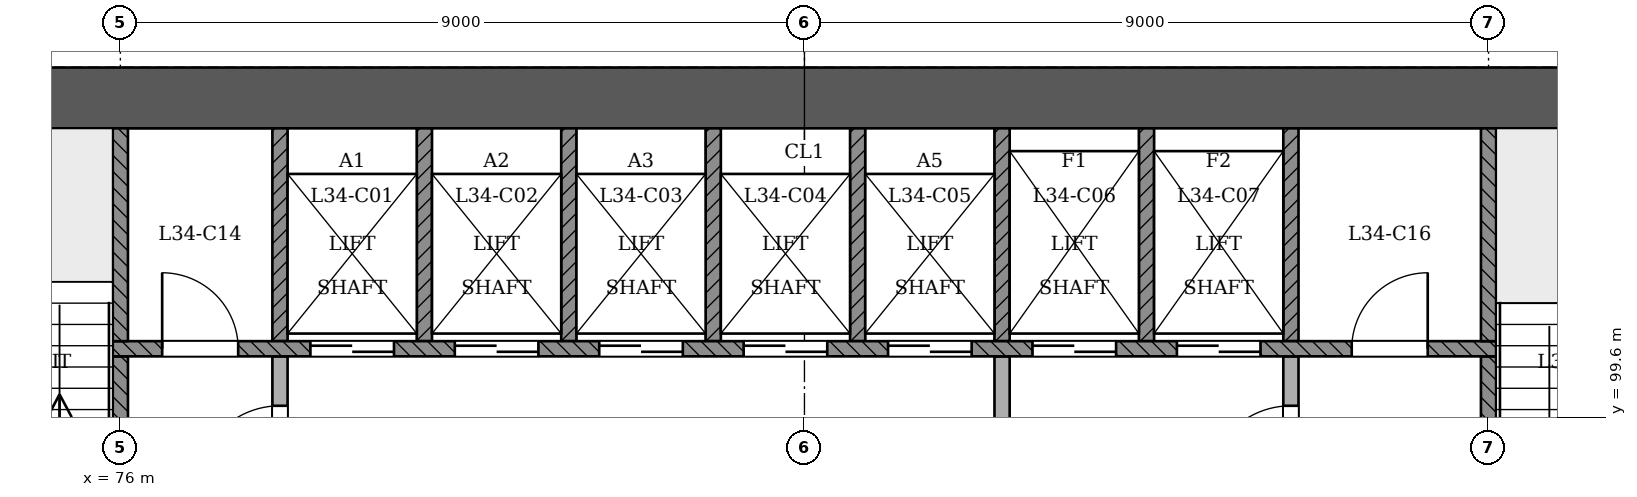
"""IFC4 building model, lengths in metres.
Left out: names, types, materials, properties, quantities, classifications, styles, units other than length and angle.
Written with IfcOpenShell. Run it as: python <this file> out.ifc"""

import sys

from ifc_helpers import new_model, si_unit, direction, frame, frame_2d, origin, place, context, subcontext, project, spatial, rectangle, extrude, element, fill, save


model = new_model("IFC4")
c1 = context("Model", 3, precision=1e-05, world=origin(), true_north=direction((0.0, 1.0)))
c2 = subcontext(c1, "Body", "Model", "MODEL_VIEW")
j1 = project(units=[si_unit("LENGTHUNIT", "METRE"), si_unit("PLANEANGLEUNIT", "RADIAN")], contexts=[c1])
p1 = place(None, origin())
s1 = spatial("IfcSite", under=j1, at=p1, CompositionType="ELEMENT")
p2 = place(p1, origin())
s2 = spatial("IfcBuilding", under=s1, at=p2, CompositionType="ELEMENT")
p3 = place(p2, frame((0.0, 0.0, 135.0)))
s3 = spatial("IfcBuildingStorey", under=s2, at=p3, CompositionType="ELEMENT", Elevation=135.0)
p4 = place(p3, frame((97.4, 103.8, 0.0), z_axis=(0.0, 0.0, 1.0), x_axis=(-1.0, 0.0, 0.0)))
e1 = element("IfcWall", 1, at=p4, inside=s3, PredefinedType="SHEAR", context=c2, shape_type="SweptSolid", body=[
    extrude(rectangle(XDim=25.2, YDim=0.8, at=frame_2d((12.6, 0.0))), origin(), (0.0, 0.0, 1.0), 3.6),
])
p5 = place(p3, frame((87.6, 93.4, 0.0), z_axis=(0.0, 0.0, 1.0), x_axis=(0.0, 1.0, 0.0)))
e2 = element("IfcWall", 2, at=p5, inside=s3, PredefinedType="PARTITIONING", context=c2, shape_type="SweptSolid", body=[
    extrude(rectangle(XDim=7.0, YDim=0.2, at=frame_2d((3.5, 0.0))), origin(), (0.0, 0.0, 1.0), 3.15),
])
p6 = place(p5, frame((4.45, 0.0, 0.0)))
e3 = element("IfcOpeningElement", 3, at=p6, cuts=e2, PredefinedType="OPENING", context=c2, shape_type="SweptSolid", body=[
    extrude(rectangle(XDim=1.1, YDim=2.1, at=frame_2d((0.55, 1.05))), frame((0.0, 0.11, 0.0), z_axis=(0.0, -1.0, 0.0), x_axis=(1.0, 0.0, 0.0)), (0.0, 0.0, 1.0), 0.221),
])
p7 = place(p3, frame((91.4, 96.2, 0.0), z_axis=(0.0, 0.0, 1.0), x_axis=(0.0, 1.0, 0.0)))
e4 = element("IfcWall", 4, at=p7, inside=s3, PredefinedType="PARTITIONING", context=c2, shape_type="SweptSolid", body=[
    extrude(rectangle(XDim=4.2, YDim=0.2, at=frame_2d((2.1, 0.0))), origin(), (0.0, 0.0, 1.0), 3.15),
])
p8 = place(p7, frame((2.45, 0.0, 0.0)))
e5 = element("IfcOpeningElement", 5, at=p8, cuts=e4, PredefinedType="OPENING", context=c2, shape_type="SweptSolid", body=[
    extrude(rectangle(XDim=1.1, YDim=2.1, at=frame_2d((0.55, 1.05))), frame((0.0, 0.11, 0.0), z_axis=(0.0, -1.0, 0.0), x_axis=(1.0, 0.0, 0.0)), (0.0, 0.0, 1.0), 0.221),
])
p9 = place(p3, frame((76.0, 96.7, 0.0), z_axis=(0.0, 0.0, 1.0), x_axis=(0.0, 1.0, 0.0)))
e6 = element("IfcWall", 6, at=p9, inside=s3, PredefinedType="SOLIDWALL", context=c2, shape_type="SweptSolid", body=[
    extrude(rectangle(XDim=3.7, YDim=0.2, at=frame_2d((1.85, 0.0))), origin(), (0.0, 0.0, 1.0), 3.15),
])
p10 = place(p9, frame((0.35, 0.0, 0.0)))
e7 = element("IfcOpeningElement", 7, at=p10, cuts=e6, PredefinedType="OPENING", context=c2, shape_type="SweptSolid", body=[
    extrude(rectangle(XDim=1.1, YDim=2.1, at=frame_2d((0.55, 1.05))), frame((0.0, 0.11, 0.0), z_axis=(0.0, -1.0, 0.0), x_axis=(1.0, 0.0, 0.0)), (0.0, 0.0, 1.0), 0.221),
])
p11 = place(p3, frame((78.1, 96.7, 0.0), z_axis=(0.0, 0.0, 1.0), x_axis=(0.0, 1.0, 0.0)))
e8 = element("IfcWall", 8, at=p11, inside=s3, PredefinedType="PARTITIONING", context=c2, shape_type="SweptSolid", body=[
    extrude(rectangle(XDim=3.7, YDim=0.2, at=frame_2d((1.85, 0.0))), origin(), (0.0, 0.0, 1.0), 3.15),
])
p12 = place(p11, frame((1.95, 0.0, 0.0)))
e9 = element("IfcOpeningElement", 9, at=p12, cuts=e8, PredefinedType="OPENING", context=c2, shape_type="SweptSolid", body=[
    extrude(rectangle(XDim=1.1, YDim=2.1, at=frame_2d((0.55, 1.05))), frame((0.0, 0.11, 0.0), z_axis=(0.0, -1.0, 0.0), x_axis=(1.0, 0.0, 0.0)), (0.0, 0.0, 1.0), 0.221),
])
p13 = place(p3, frame((94.0, 96.7, 0.0), z_axis=(0.0, 0.0, 1.0), x_axis=(0.0, 1.0, 0.0)))
e10 = element("IfcWall", 10, at=p13, inside=s3, PredefinedType="SOLIDWALL", context=c2, shape_type="SweptSolid", body=[
    extrude(rectangle(XDim=3.7, YDim=0.2, at=frame_2d((1.85, 0.0))), origin(), (0.0, 0.0, 1.0), 3.15),
])
p14 = place(p13, frame((0.35, 0.0, 0.0)))
e11 = element("IfcOpeningElement", 11, at=p14, cuts=e10, PredefinedType="OPENING", context=c2, shape_type="SweptSolid", body=[
    extrude(rectangle(XDim=1.1, YDim=2.1, at=frame_2d((0.55, 1.05))), frame((0.0, 0.11, 0.0), z_axis=(0.0, -1.0, 0.0), x_axis=(1.0, 0.0, 0.0)), (0.0, 0.0, 1.0), 0.221),
])
p15 = place(p3, frame((75.9, 100.5, 0.0), z_axis=(0.0, 0.0, 1.0), x_axis=(1.0, 0.0, 0.0)))
e12 = element("IfcWall", 12, at=p15, inside=s3, PredefinedType="SOLIDWALL", context=c2, shape_type="SweptSolid", body=[
    extrude(rectangle(XDim=18.2, YDim=0.2, at=frame_2d((9.1, 0.0))), origin(), (0.0, 0.0, 1.0), 3.15),
])
p16 = place(p15, frame((2.6, 0.0, 0.0)))
e13 = element("IfcOpeningElement", 13, at=p16, cuts=e12, PredefinedType="OPENING", context=c2, shape_type="SweptSolid", body=[
    extrude(rectangle(XDim=1.1, YDim=2.1, at=frame_2d((0.55, 1.05))), frame((0.0, 0.11, 0.0), z_axis=(0.0, -1.0, 0.0), x_axis=(1.0, 0.0, 0.0)), (0.0, 0.0, 1.0), 0.221),
])
p17 = place(p15, frame((4.5, 0.0, 0.0)))
e14 = element("IfcOpeningElement", 14, at=p17, cuts=e12, PredefinedType="OPENING", context=c2, shape_type="SweptSolid", body=[
    extrude(rectangle(XDim=1.1, YDim=2.1, at=frame_2d((0.55, 1.05))), frame((0.0, 0.11, 0.0), z_axis=(0.0, -1.0, 0.0), x_axis=(1.0, 0.0, 0.0)), (0.0, 0.0, 1.0), 0.221),
])
p18 = place(p15, frame((6.4, 0.0, 0.0)))
e15 = element("IfcOpeningElement", 15, at=p18, cuts=e12, PredefinedType="OPENING", context=c2, shape_type="SweptSolid", body=[
    extrude(rectangle(XDim=1.1, YDim=2.1, at=frame_2d((0.55, 1.05))), frame((0.0, 0.11, 0.0), z_axis=(0.0, -1.0, 0.0), x_axis=(1.0, 0.0, 0.0)), (0.0, 0.0, 1.0), 0.221),
])
p19 = place(p15, frame((8.3, 0.0, 0.0)))
e16 = element("IfcOpeningElement", 16, at=p19, cuts=e12, PredefinedType="OPENING", context=c2, shape_type="SweptSolid", body=[
    extrude(rectangle(XDim=1.1, YDim=2.1, at=frame_2d((0.55, 1.05))), frame((0.0, 0.11, 0.0), z_axis=(0.0, -1.0, 0.0), x_axis=(1.0, 0.0, 0.0)), (0.0, 0.0, 1.0), 0.221),
])
p20 = place(p15, frame((10.2, 0.0, 0.0)))
e17 = element("IfcOpeningElement", 17, at=p20, cuts=e12, PredefinedType="OPENING", context=c2, shape_type="SweptSolid", body=[
    extrude(rectangle(XDim=1.1, YDim=2.1, at=frame_2d((0.55, 1.05))), frame((0.0, 0.11, 0.0), z_axis=(0.0, -1.0, 0.0), x_axis=(1.0, 0.0, 0.0)), (0.0, 0.0, 1.0), 0.221),
])
p21 = place(p15, frame((12.1, 0.0, 0.0)))
e18 = element("IfcOpeningElement", 18, at=p21, cuts=e12, PredefinedType="OPENING", context=c2, shape_type="SweptSolid", body=[
    extrude(rectangle(XDim=1.1, YDim=2.1, at=frame_2d((0.55, 1.05))), frame((0.0, 0.11, 0.0), z_axis=(0.0, -1.0, 0.0), x_axis=(1.0, 0.0, 0.0)), (0.0, 0.0, 1.0), 0.221),
])
p22 = place(p15, frame((14.0, 0.0, 0.0)))
e19 = element("IfcOpeningElement", 19, at=p22, cuts=e12, PredefinedType="OPENING", context=c2, shape_type="SweptSolid", body=[
    extrude(rectangle(XDim=1.1, YDim=2.1, at=frame_2d((0.55, 1.05))), frame((0.0, 0.11, 0.0), z_axis=(0.0, -1.0, 0.0), x_axis=(1.0, 0.0, 0.0)), (0.0, 0.0, 1.0), 0.221),
])
p23 = place(p15, frame((0.65, 0.0, 0.0)))
e20 = element("IfcOpeningElement", 20, at=p23, cuts=e12, PredefinedType="OPENING", context=c2, shape_type="SweptSolid", body=[
    extrude(rectangle(XDim=1.0, YDim=2.1, at=frame_2d((0.5, 1.05))), frame((0.0, 0.11, 0.0), z_axis=(0.0, -1.0, 0.0), x_axis=(1.0, 0.0, 0.0)), (0.0, 0.0, 1.0), 0.221),
])
p24 = place(p15, frame((16.3, 0.0, 0.0)))
e21 = element("IfcOpeningElement", 21, at=p24, cuts=e12, PredefinedType="OPENING", context=c2, shape_type="SweptSolid", body=[
    extrude(rectangle(XDim=1.0, YDim=2.1, at=frame_2d((0.5, 1.05))), frame((0.0, 0.11, 0.0), z_axis=(0.0, -1.0, 0.0), x_axis=(1.0, 0.0, 0.0)), (0.0, 0.0, 1.0), 0.221),
])
for number, where, z_axis, x_axis in (
    (22, (76.0, 100.6, 0.0), (0.0, 0.0, 1.0), (0.0, 1.0, 0.0)),
    (23, (78.1, 100.6, 0.0), (0.0, 0.0, 1.0), (0.0, 1.0, 0.0)),
    (24, (80.0, 100.6, 0.0), (0.0, 0.0, 1.0), (0.0, 1.0, 0.0)),
    (25, (81.9, 100.6, 0.0), (0.0, 0.0, 1.0), (0.0, 1.0, 0.0)),
    (26, (83.8, 100.6, 0.0), (0.0, 0.0, 1.0), (0.0, 1.0, 0.0)),
    (27, (85.7, 100.6, 0.0), (0.0, 0.0, 1.0), (0.0, 1.0, 0.0)),
    (28, (87.6, 100.6, 0.0), (0.0, 0.0, 1.0), (0.0, 1.0, 0.0)),
    (29, (89.5, 100.6, 0.0), (0.0, 0.0, 1.0), (0.0, 1.0, 0.0)),
    (30, (91.4, 100.6, 0.0), (0.0, 0.0, 1.0), (0.0, 1.0, 0.0)),
    (31, (94.0, 100.6, 0.0), (0.0, 0.0, 1.0), (0.0, 1.0, 0.0)),
):
    element("IfcWall", number, at=place(p3, frame(where, z_axis=z_axis, x_axis=x_axis)), inside=s3, PredefinedType="SOLIDWALL", context=c2, shape_type="SweptSolid", body=[
        extrude(rectangle(XDim=2.8, YDim=0.2, at=frame_2d((1.4, 0.0))), origin(), (0.0, 0.0, 1.0), 3.15),
    ])
p25 = place(p16, origin())
e32 = element("IfcDoor", 32, at=p25, inside=s3, OperationType="SLIDING_TO_RIGHT", PredefinedType="NOTDEFINED", context=c2, shape_type="SweptSolid", body=[
    extrude(rectangle(XDim=1.1, YDim=2.1, at=frame_2d((0.55, 1.05))), frame((0.0, 0.025, 0.0), z_axis=(0.0, -1.0, 0.0), x_axis=(1.0, 0.0, 0.0)), (0.0, 0.0, 1.0), 0.05),
])
fill(e13, e32)
p26 = place(p17, origin())
e33 = element("IfcDoor", 33, at=p26, inside=s3, OperationType="SLIDING_TO_LEFT", PredefinedType="NOTDEFINED", context=c2, shape_type="SweptSolid", body=[
    extrude(rectangle(XDim=1.1, YDim=2.1, at=frame_2d((0.55, 1.05))), frame((0.0, 0.025, 0.0), z_axis=(0.0, -1.0, 0.0), x_axis=(1.0, 0.0, 0.0)), (0.0, 0.0, 1.0), 0.05),
])
fill(e14, e33)
p27 = place(p18, origin())
e34 = element("IfcDoor", 34, at=p27, inside=s3, OperationType="SLIDING_TO_RIGHT", PredefinedType="NOTDEFINED", context=c2, shape_type="SweptSolid", body=[
    extrude(rectangle(XDim=1.1, YDim=2.1, at=frame_2d((0.55, 1.05))), frame((0.0, 0.025, 0.0), z_axis=(0.0, -1.0, 0.0), x_axis=(1.0, 0.0, 0.0)), (0.0, 0.0, 1.0), 0.05),
])
fill(e15, e34)
p28 = place(p19, origin())
e35 = element("IfcDoor", 35, at=p28, inside=s3, OperationType="SLIDING_TO_LEFT", PredefinedType="NOTDEFINED", context=c2, shape_type="SweptSolid", body=[
    extrude(rectangle(XDim=1.1, YDim=2.1, at=frame_2d((0.55, 1.05))), frame((0.0, 0.025, 0.0), z_axis=(0.0, -1.0, 0.0), x_axis=(1.0, 0.0, 0.0)), (0.0, 0.0, 1.0), 0.05),
])
fill(e16, e35)
p29 = place(p20, origin())
e36 = element("IfcDoor", 36, at=p29, inside=s3, OperationType="SLIDING_TO_RIGHT", PredefinedType="NOTDEFINED", context=c2, shape_type="SweptSolid", body=[
    extrude(rectangle(XDim=1.1, YDim=2.1, at=frame_2d((0.55, 1.05))), frame((0.0, 0.025, 0.0), z_axis=(0.0, -1.0, 0.0), x_axis=(1.0, 0.0, 0.0)), (0.0, 0.0, 1.0), 0.05),
])
fill(e17, e36)
p30 = place(p21, origin())
e37 = element("IfcDoor", 37, at=p30, inside=s3, OperationType="SLIDING_TO_RIGHT", PredefinedType="NOTDEFINED", context=c2, shape_type="SweptSolid", body=[
    extrude(rectangle(XDim=1.1, YDim=2.1, at=frame_2d((0.55, 1.05))), frame((0.0, 0.025, 0.0), z_axis=(0.0, -1.0, 0.0), x_axis=(1.0, 0.0, 0.0)), (0.0, 0.0, 1.0), 0.05),
])
fill(e18, e37)
p31 = place(p22, origin())
e38 = element("IfcDoor", 38, at=p31, inside=s3, OperationType="SLIDING_TO_LEFT", PredefinedType="NOTDEFINED", context=c2, shape_type="SweptSolid", body=[
    extrude(rectangle(XDim=1.1, YDim=2.1, at=frame_2d((0.55, 1.05))), frame((0.0, 0.025, 0.0), z_axis=(0.0, -1.0, 0.0), x_axis=(1.0, 0.0, 0.0)), (0.0, 0.0, 1.0), 0.05),
])
fill(e19, e38)
p32 = place(p12, origin())
e39 = element("IfcDoor", 39, at=p32, inside=s3, OperationType="SINGLE_SWING_LEFT", PredefinedType="NOTDEFINED", context=c2, shape_type="SweptSolid", body=[
    extrude(rectangle(XDim=1.1, YDim=2.1, at=frame_2d((0.55, 1.05))), frame((0.0, 0.025, 0.0), z_axis=(0.0, -1.0, 0.0), x_axis=(1.0, 0.0, 0.0)), (0.0, 0.0, 1.0), 0.05),
])
fill(e9, e39)
p33 = place(p8, origin())
e40 = element("IfcDoor", 40, at=p33, inside=s3, OperationType="SINGLE_SWING_LEFT", PredefinedType="NOTDEFINED", context=c2, shape_type="SweptSolid", body=[
    extrude(rectangle(XDim=1.1, YDim=2.1, at=frame_2d((0.55, 1.05))), frame((0.0, 0.025, 0.0), z_axis=(0.0, -1.0, 0.0), x_axis=(1.0, 0.0, 0.0)), (0.0, 0.0, 1.0), 0.05),
])
fill(e5, e40)
p34 = place(p23, origin())
e41 = element("IfcDoor", 41, at=p34, inside=s3, OperationType="SINGLE_SWING_LEFT", PredefinedType="NOTDEFINED", context=c2, shape_type="SweptSolid", body=[
    extrude(rectangle(XDim=1.0, YDim=2.1, at=frame_2d((0.5, 1.05))), frame((0.0, 0.025, 0.0), z_axis=(0.0, -1.0, 0.0), x_axis=(1.0, 0.0, 0.0)), (0.0, 0.0, 1.0), 0.05),
])
fill(e20, e41)
p35 = place(p24, origin())
e42 = element("IfcDoor", 42, at=p35, inside=s3, OperationType="SINGLE_SWING_RIGHT", PredefinedType="NOTDEFINED", context=c2, shape_type="SweptSolid", body=[
    extrude(rectangle(XDim=1.0, YDim=2.1, at=frame_2d((0.5, 1.05))), frame((0.0, 0.025, 0.0), z_axis=(0.0, -1.0, 0.0), x_axis=(1.0, 0.0, 0.0)), (0.0, 0.0, 1.0), 0.05),
])
fill(e21, e42)
save(model, sys.argv[1])
